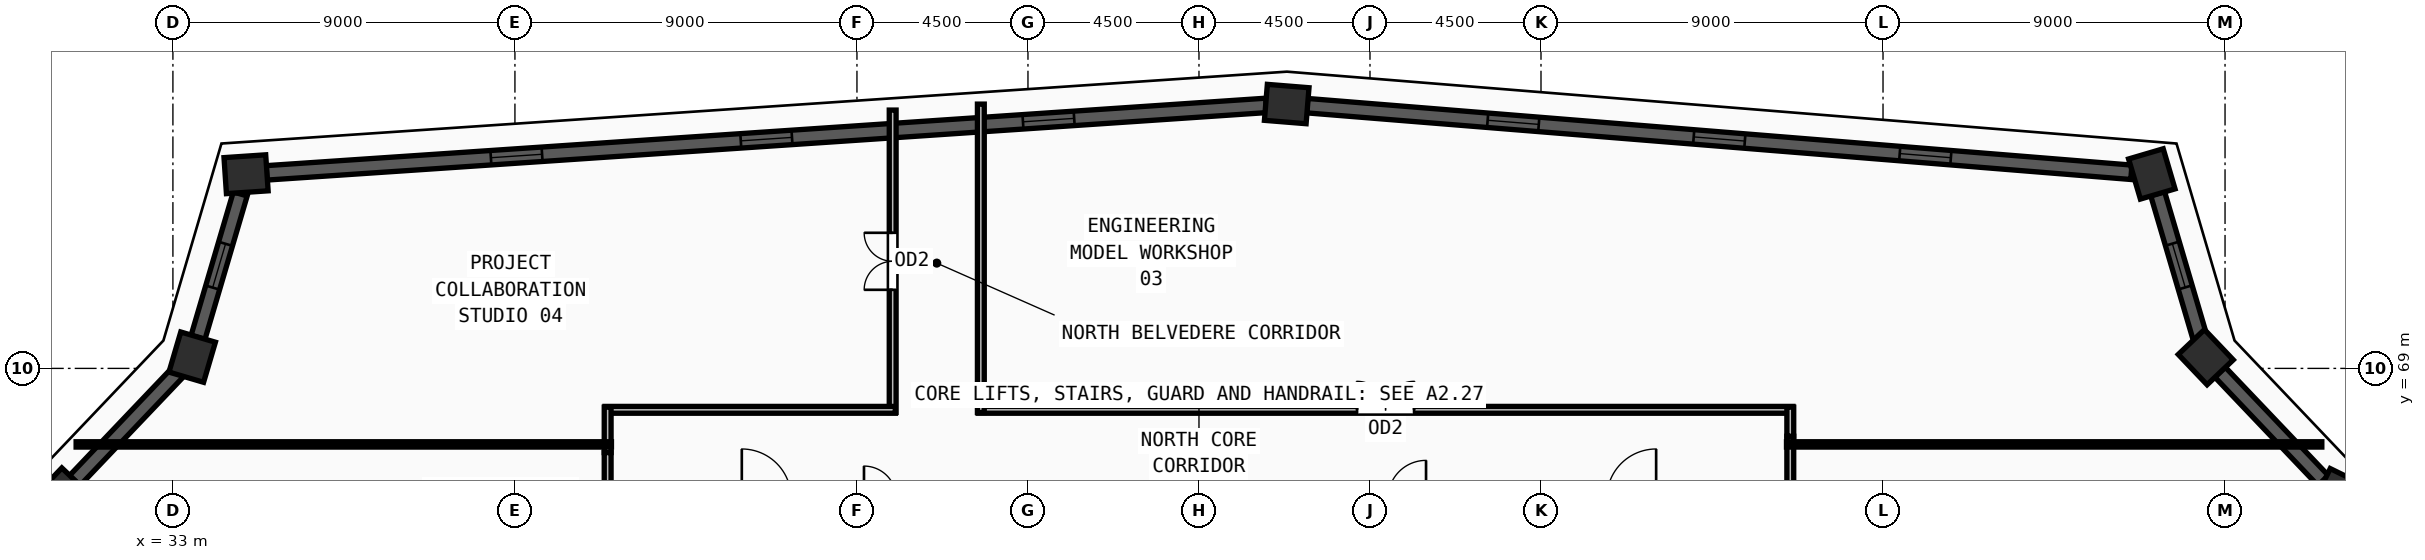
"""IFC4 building model, lengths in metres.
Left out: names, types, materials, properties, quantities, classifications, styles, units other than length and angle.
Written with IfcOpenShell. Run it as: python <this file> out.ifc"""

import sys

from ifc_helpers import new_model, si_unit, direction, frame, frame_2d, origin, origin_2d, place, context, subcontext, project, spatial, rectangle, extrude, source, transform, mapped, element, fill, save


model = new_model("IFC4")
c1 = context("Model", 3, precision=1e-05, world=origin(), true_north=direction((0.0, 1.0)))
c2 = subcontext(c1, "Body", "Model", "MODEL_VIEW")
j1 = project(units=[si_unit("LENGTHUNIT", "METRE"), si_unit("PLANEANGLEUNIT", "RADIAN")], contexts=[c1])
p1 = place(None, origin())
s1 = spatial("IfcSite", under=j1, at=p1, CompositionType="ELEMENT")
p2 = place(p1, origin())
s2 = spatial("IfcBuilding", under=s1, at=p2, CompositionType="ELEMENT")
p3 = place(p2, frame((0.0, 0.0, 309.0)))
s3 = spatial("IfcBuildingStorey", under=s2, at=p3, CompositionType="ELEMENT", Elevation=309.0)
m1 = source(origin(), c2, "Body", "SweptSolid", [
    extrude(rectangle(XDim=1.1, YDim=0.95, at=origin_2d()), origin(), (0.0, 0.0, 1.0), 3.75),
])
for number, where, z_axis, x_axis in (
    (1, (30.042, 65.655, 0.0), (0.0, 0.0, 1.0), (0.689, 0.724, 0.0)),
    (2, (33.507, 69.296, 0.0), (0.0, 0.0, 1.0), (0.283, 0.959, 0.0)),
    (3, (34.925, 74.109, 0.0), (0.0, 0.0, 1.0), (0.998, 0.067, 0.0)),
    (4, (62.309, 75.956, 0.0), (0.0, 0.0, 1.0), (-0.997, 0.081, 0.0)),
    (5, (85.073, 74.117, 0.0), (0.0, 0.0, 1.0), (-0.283, 0.959, 0.0)),
    (6, (86.493, 69.296, 0.0), (0.0, 0.0, 1.0), (-0.689, 0.724, 0.0)),
    (7, (89.952, 65.661, 0.0), (0.0, 0.0, 1.0), (0.441, 0.898, 0.0)),
):
    element("IfcColumn", number, at=place(p3, frame(where, z_axis=z_axis, x_axis=x_axis)), inside=s3, PredefinedType="COLUMN", context=c2, shape_type="MappedRepresentation", body=[
        mapped(m1, transform((0.0, 0.0, 0.0), x_axis=(1.0, 0.0, 0.0), y_axis=(0.0, 1.0, 0.0), z_axis=(0.0, 0.0, 1.0), scale=1.0)),
    ])
p4 = place(p3, frame((89.58, 66.052, 0.0), z_axis=(0.0, 0.0, 1.0), x_axis=(-0.689378051653, 0.724401754484, 0.0)))
e8 = element("IfcWall", 8, at=p4, inside=s3, PredefinedType="SOLIDWALL", context=c2, shape_type="SweptSolid", body=[
    extrude(rectangle(XDim=3.938, YDim=0.38, at=frame_2d((1.969, 0.0))), origin(), (0.0, 0.0, 1.0), 3.57),
])
p5 = place(p3, frame((86.34, 69.814, 0.0), z_axis=(0.0, 0.0, 1.0), x_axis=(-0.28233716639, 0.959315237279, 0.0)))
e9 = element("IfcWall", 9, at=p5, inside=s3, PredefinedType="SOLIDWALL", context=c2, shape_type="SweptSolid", body=[
    extrude(rectangle(XDim=3.946, YDim=0.38, at=frame_2d((1.973, 0.0))), origin(), (0.0, 0.0, 1.0), 3.57),
])
m2 = source(origin(), c2, "Body", "SweptSolid", [
    extrude(rectangle(XDim=1.2, YDim=1.9, at=frame_2d((0.6, 0.95))), frame((0.0, 0.2, 0.0), z_axis=(0.0, -1.0, 0.0), x_axis=(1.0, 0.0, 0.0)), (0.0, 0.0, 1.0), 0.4),
])
p6 = place(p5, frame((1.373, 0.0, 0.55)))
e10 = element("IfcOpeningElement", 10, at=p6, cuts=e9, PredefinedType="OPENING", context=c2, shape_type="MappedRepresentation", body=[
    mapped(m2, transform((0.0, 0.0, 0.0), x_axis=(1.0, 0.0, 0.0), y_axis=(0.0, 1.0, 0.0), z_axis=(0.0, 0.0, 1.0), scale=1.0)),
])
p7 = place(p3, frame((84.535, 74.16, 0.0), z_axis=(0.0, 0.0, 1.0), x_axis=(-0.996748682723, 0.080573342308, 0.0)))
e11 = element("IfcWall", 11, at=p7, inside=s3, PredefinedType="SOLIDWALL", context=c2, shape_type="SweptSolid", body=[
    extrude(rectangle(XDim=21.759, YDim=0.38, at=frame_2d((10.879, 0.0))), origin(), (0.0, 0.0, 1.0), 3.57),
])
m3 = source(origin(), c2, "Body", "SweptSolid", [
    extrude(rectangle(XDim=1.35, YDim=1.85, at=frame_2d((0.675, 0.925))), frame((0.0, 0.2, 0.0), z_axis=(0.0, -1.0, 0.0), x_axis=(1.0, 0.0, 0.0)), (0.0, 0.0, 1.0), 0.4),
])
p8 = place(p7, frame((4.765, 0.0, 0.55)))
e12 = element("IfcOpeningElement", 12, at=p8, cuts=e11, PredefinedType="OPENING", context=c2, shape_type="MappedRepresentation", body=[
    mapped(m3, transform((0.0, 0.0, 0.0), x_axis=(1.0, 0.0, 0.0), y_axis=(0.0, 1.0, 0.0), z_axis=(0.0, 0.0, 1.0), scale=1.0)),
])
p9 = place(p7, frame((10.204, 0.0, 0.55)))
e13 = element("IfcOpeningElement", 13, at=p9, cuts=e11, PredefinedType="OPENING", context=c2, shape_type="MappedRepresentation", body=[
    mapped(m3, transform((0.0, 0.0, 0.0), x_axis=(1.0, 0.0, 0.0), y_axis=(0.0, 1.0, 0.0), z_axis=(0.0, 0.0, 1.0), scale=1.0)),
])
p10 = place(p7, frame((15.644, 0.0, 0.55)))
e14 = element("IfcOpeningElement", 14, at=p10, cuts=e11, PredefinedType="OPENING", context=c2, shape_type="MappedRepresentation", body=[
    mapped(m3, transform((0.0, 0.0, 0.0), x_axis=(1.0, 0.0, 0.0), y_axis=(0.0, 1.0, 0.0), z_axis=(0.0, 0.0, 1.0), scale=1.0)),
])
p11 = place(p3, frame((61.77, 75.92, 0.0), z_axis=(0.0, 0.0, 1.0), x_axis=(-0.997731532318, -0.067318566668, 0.0)))
e15 = element("IfcWall", 15, at=p11, inside=s3, PredefinedType="SOLIDWALL", context=c2, shape_type="SweptSolid", body=[
    extrude(rectangle(XDim=26.366, YDim=0.38, at=frame_2d((13.183, 0.0))), origin(), (0.0, 0.0, 1.0), 3.57),
])
p12 = place(p11, frame((5.066, 0.0, 0.55)))
e16 = element("IfcOpeningElement", 16, at=p12, cuts=e15, PredefinedType="OPENING", context=c2, shape_type="MappedRepresentation", body=[
    mapped(m3, transform((0.0, 0.0, 0.0), x_axis=(1.0, 0.0, 0.0), y_axis=(0.0, 1.0, 0.0), z_axis=(0.0, 0.0, 1.0), scale=1.0)),
])
p13 = place(p11, frame((12.508, 0.0, 0.55)))
e17 = element("IfcOpeningElement", 17, at=p13, cuts=e15, PredefinedType="OPENING", context=c2, shape_type="MappedRepresentation", body=[
    mapped(m3, transform((0.0, 0.0, 0.0), x_axis=(1.0, 0.0, 0.0), y_axis=(0.0, 1.0, 0.0), z_axis=(0.0, 0.0, 1.0), scale=1.0)),
])
p14 = place(p11, frame((19.099, 0.0, 0.55)))
e18 = element("IfcOpeningElement", 18, at=p14, cuts=e15, PredefinedType="OPENING", context=c2, shape_type="MappedRepresentation", body=[
    mapped(m3, transform((0.0, 0.0, 0.0), x_axis=(1.0, 0.0, 0.0), y_axis=(0.0, 1.0, 0.0), z_axis=(0.0, 0.0, 1.0), scale=1.0)),
])
p15 = place(p3, frame((34.772, 73.591, 0.0), z_axis=(0.0, 0.0, 1.0), x_axis=(-0.282434871617, -0.959286476134, 0.0)))
e19 = element("IfcWall", 19, at=p15, inside=s3, PredefinedType="SOLIDWALL", context=c2, shape_type="SweptSolid", body=[
    extrude(rectangle(XDim=3.938, YDim=0.38, at=frame_2d((1.969, 0.0))), origin(), (0.0, 0.0, 1.0), 3.57),
])
p16 = place(p15, frame((1.369, 0.0, 0.55)))
e20 = element("IfcOpeningElement", 20, at=p16, cuts=e19, PredefinedType="OPENING", context=c2, shape_type="MappedRepresentation", body=[
    mapped(m2, transform((0.0, 0.0, 0.0), x_axis=(1.0, 0.0, 0.0), y_axis=(0.0, 1.0, 0.0), z_axis=(0.0, 0.0, 1.0), scale=1.0)),
])
p17 = place(p3, frame((33.135, 68.905, 0.0), z_axis=(0.0, 0.0, 1.0), x_axis=(-0.689384826268, -0.724395307351, 0.0)))
e21 = element("IfcWall", 21, at=p17, inside=s3, PredefinedType="SOLIDWALL", context=c2, shape_type="SweptSolid", body=[
    extrude(rectangle(XDim=3.947, YDim=0.38, at=frame_2d((1.974, 0.0))), origin(), (0.0, 0.0, 1.0), 3.57),
])
p18 = place(p3, frame((75.56, 67.215, 0.0), z_axis=(0.0, 0.0, 1.0), x_axis=(0.0, -1.0, 0.0)))
e22 = element("IfcWall", 22, at=p18, inside=s3, PredefinedType="PARTITIONING", context=c2, shape_type="SweptSolid", body=[
    extrude(rectangle(XDim=9.0, YDim=0.18, at=frame_2d((4.5, 0.0))), origin(), (0.0, 0.0, 1.0), 3.57),
])
m4 = source(origin(), c2, "Body", "SweptSolid", [
    extrude(rectangle(XDim=1.0, YDim=2.2, at=frame_2d((0.5, 1.1))), frame((0.0, 0.1, 0.0), z_axis=(0.0, -1.0, 0.0), x_axis=(1.0, 0.0, 0.0)), (0.0, 0.0, 1.0), 0.2),
])
p19 = place(p18, frame((4.0, 0.0, 0.0)))
e23 = element("IfcOpeningElement", 23, at=p19, cuts=e22, PredefinedType="OPENING", context=c2, shape_type="MappedRepresentation", body=[
    mapped(m4, transform((0.0, 0.0, 0.0), x_axis=(1.0, 0.0, 0.0), y_axis=(0.0, 1.0, 0.0), z_axis=(0.0, 0.0, 1.0), scale=1.0)),
])
p20 = place(p3, frame((54.19, 67.91, 0.0), z_axis=(0.0, 0.0, 1.0), x_axis=(1.0, 0.0, 0.0)))
e24 = element("IfcWall", 24, at=p20, inside=s3, PredefinedType="PARTITIONING", context=c2, shape_type="SweptSolid", body=[
    extrude(rectangle(XDim=21.44, YDim=0.18, at=frame_2d((10.72, 0.0))), origin(), (0.0, 0.0, 1.0), 3.261),
])
m5 = source(origin(), c2, "Body", "SweptSolid", [
    extrude(rectangle(XDim=1.5, YDim=2.2, at=frame_2d((0.75, 1.1))), frame((0.0, 0.1, 0.0), z_axis=(0.0, -1.0, 0.0), x_axis=(1.0, 0.0, 0.0)), (0.0, 0.0, 1.0), 0.2),
])
p21 = place(p20, frame((9.97, 0.0, 0.0)))
e25 = element("IfcOpeningElement", 25, at=p21, cuts=e24, PredefinedType="OPENING", context=c2, shape_type="MappedRepresentation", body=[
    mapped(m5, transform((0.0, 0.0, 0.0), x_axis=(1.0, 0.0, 0.0), y_axis=(0.0, 1.0, 0.0), z_axis=(0.0, 0.0, 1.0), scale=1.0)),
])
p22 = place(p3, frame((51.94, 67.84, 0.0), z_axis=(0.0, 0.0, 1.0), x_axis=(0.0, 1.0, 0.0)))
e26 = element("IfcWall", 26, at=p22, inside=s3, PredefinedType="PARTITIONING", context=c2, shape_type="SweptSolid", body=[
    extrude(rectangle(XDim=7.957, YDim=0.18, at=frame_2d((3.979, 0.0))), origin(), (0.0, 0.0, 1.0), 3.57),
])
p23 = place(p22, frame((3.228, 0.0, 0.0)))
e27 = element("IfcOpeningElement", 27, at=p23, cuts=e26, PredefinedType="OPENING", context=c2, shape_type="MappedRepresentation", body=[
    mapped(m5, transform((0.0, 0.0, 0.0), x_axis=(1.0, 0.0, 0.0), y_axis=(0.0, 1.0, 0.0), z_axis=(0.0, 0.0, 1.0), scale=1.0)),
])
p24 = place(p3, frame((54.26, 75.954, 0.0), z_axis=(0.0, 0.0, 1.0), x_axis=(0.0, -1.0, 0.0)))
e28 = element("IfcWall", 28, at=p24, inside=s3, PredefinedType="PARTITIONING", context=c2, shape_type="SweptSolid", body=[
    extrude(rectangle(XDim=8.114, YDim=0.18, at=frame_2d((4.057, 0.0))), origin(), (0.0, 0.0, 1.0), 3.57),
])
p25 = place(p3, frame((75.56, 67.98, 0.0), z_axis=(0.0, 0.0, 1.0), x_axis=(0.0, -1.0, 0.0)))
e29 = element("IfcWall", 29, at=p25, inside=s3, PredefinedType="PARTITIONING", context=c2, shape_type="SweptSolid", body=[
    extrude(rectangle(XDim=0.765, YDim=0.18, at=frame_2d((0.382, 0.0))), origin(), (0.0, 0.0, 1.0), 3.57),
])
p26 = place(p3, frame((44.37, 67.91, 0.0), z_axis=(0.0, 0.0, 1.0), x_axis=(1.0, 0.0, 0.0)))
e30 = element("IfcWall", 30, at=p26, inside=s3, PredefinedType="PARTITIONING", context=c2, shape_type="SweptSolid", body=[
    extrude(rectangle(XDim=7.64, YDim=0.18, at=frame_2d((3.82, 0.0))), origin(), (0.0, 0.0, 1.0), 3.57),
])
p27 = place(p3, frame((44.44, 66.785, 0.0), z_axis=(0.0, 0.0, 1.0), x_axis=(0.0, 1.0, 0.0)))
e31 = element("IfcWall", 31, at=p27, inside=s3, PredefinedType="PARTITIONING", context=c2, shape_type="SweptSolid", body=[
    extrude(rectangle(XDim=1.195, YDim=0.18, at=frame_2d((0.598, 0.0))), origin(), (0.0, 0.0, 1.0), 3.57),
])
p28 = place(p3, frame((44.44, 64.98, 0.0), z_axis=(0.0, 0.0, 1.0), x_axis=(0.0, 1.0, 0.0)))
e32 = element("IfcWall", 32, at=p28, inside=s3, PredefinedType="PARTITIONING", context=c2, shape_type="SweptSolid", body=[
    extrude(rectangle(XDim=1.805, YDim=0.18, at=frame_2d((0.902, 0.0))), origin(), (0.0, 0.0, 1.0), 3.57),
])
for number, where, z_axis, x_axis in (
    (33, (44.54, 67.0, 0.0), (0.0, 0.0, 1.0), (-1.0, 0.0, 0.0)),
    (34, (75.46, 67.0, 0.0), (0.0, 0.0, 1.0), (1.0, 0.0, 0.0)),
):
    element("IfcWall", number, at=place(p3, frame(where, z_axis=z_axis, x_axis=x_axis)), inside=s3, PredefinedType="PARTITIONING", context=c2, shape_type="SweptSolid", body=[
        extrude(rectangle(XDim=14.087, YDim=0.14, at=frame_2d((7.043, 0.0))), origin(), (0.0, 0.0, 1.0), 3.261),
    ])
m6 = source(origin(), c2, "Body", "SweptSolid", [
    extrude(rectangle(XDim=1.2, YDim=1.9, at=frame_2d((0.6, 0.95))), frame((0.0, 0.03, 0.0), z_axis=(0.0, -1.0, 0.0), x_axis=(1.0, 0.0, 0.0)), (0.0, 0.0, 1.0), 0.06),
])
p29 = place(p6, origin())
e35 = element("IfcWindow", 35, at=p29, inside=s3, PartitioningType="SINGLE_PANEL", PredefinedType="WINDOW", context=c2, shape_type="MappedRepresentation", body=[
    mapped(m6, transform((0.0, 0.0, 0.0), x_axis=(1.0, 0.0, 0.0), y_axis=(0.0, 1.0, 0.0), z_axis=(0.0, 0.0, 1.0), scale=1.0)),
])
fill(e10, e35)
m7 = source(origin(), c2, "Body", "SweptSolid", [
    extrude(rectangle(XDim=1.35, YDim=1.85, at=frame_2d((0.675, 0.925))), frame((0.0, 0.03, 0.0), z_axis=(0.0, -1.0, 0.0), x_axis=(1.0, 0.0, 0.0)), (0.0, 0.0, 1.0), 0.06),
])
p30 = place(p8, origin())
e36 = element("IfcWindow", 36, at=p30, inside=s3, PartitioningType="SINGLE_PANEL", PredefinedType="WINDOW", context=c2, shape_type="MappedRepresentation", body=[
    mapped(m7, transform((0.0, 0.0, 0.0), x_axis=(1.0, 0.0, 0.0), y_axis=(0.0, 1.0, 0.0), z_axis=(0.0, 0.0, 1.0), scale=1.0)),
])
fill(e12, e36)
p31 = place(p9, origin())
e37 = element("IfcWindow", 37, at=p31, inside=s3, PartitioningType="SINGLE_PANEL", PredefinedType="WINDOW", context=c2, shape_type="MappedRepresentation", body=[
    mapped(m7, transform((0.0, 0.0, 0.0), x_axis=(1.0, 0.0, 0.0), y_axis=(0.0, 1.0, 0.0), z_axis=(0.0, 0.0, 1.0), scale=1.0)),
])
fill(e13, e37)
p32 = place(p10, origin())
e38 = element("IfcWindow", 38, at=p32, inside=s3, PartitioningType="SINGLE_PANEL", PredefinedType="WINDOW", context=c2, shape_type="MappedRepresentation", body=[
    mapped(m7, transform((0.0, 0.0, 0.0), x_axis=(1.0, 0.0, 0.0), y_axis=(0.0, 1.0, 0.0), z_axis=(0.0, 0.0, 1.0), scale=1.0)),
])
fill(e14, e38)
p33 = place(p12, origin())
e39 = element("IfcWindow", 39, at=p33, inside=s3, PartitioningType="SINGLE_PANEL", PredefinedType="WINDOW", context=c2, shape_type="MappedRepresentation", body=[
    mapped(m7, transform((0.0, 0.0, 0.0), x_axis=(1.0, 0.0, 0.0), y_axis=(0.0, 1.0, 0.0), z_axis=(0.0, 0.0, 1.0), scale=1.0)),
])
fill(e16, e39)
p34 = place(p13, origin())
e40 = element("IfcWindow", 40, at=p34, inside=s3, PartitioningType="SINGLE_PANEL", PredefinedType="WINDOW", context=c2, shape_type="MappedRepresentation", body=[
    mapped(m7, transform((0.0, 0.0, 0.0), x_axis=(1.0, 0.0, 0.0), y_axis=(0.0, 1.0, 0.0), z_axis=(0.0, 0.0, 1.0), scale=1.0)),
])
fill(e17, e40)
p35 = place(p14, origin())
e41 = element("IfcWindow", 41, at=p35, inside=s3, PartitioningType="SINGLE_PANEL", PredefinedType="WINDOW", context=c2, shape_type="MappedRepresentation", body=[
    mapped(m7, transform((0.0, 0.0, 0.0), x_axis=(1.0, 0.0, 0.0), y_axis=(0.0, 1.0, 0.0), z_axis=(0.0, 0.0, 1.0), scale=1.0)),
])
fill(e18, e41)
p36 = place(p16, origin())
e42 = element("IfcWindow", 42, at=p36, inside=s3, PartitioningType="SINGLE_PANEL", PredefinedType="WINDOW", context=c2, shape_type="MappedRepresentation", body=[
    mapped(m6, transform((0.0, 0.0, 0.0), x_axis=(1.0, 0.0, 0.0), y_axis=(0.0, 1.0, 0.0), z_axis=(0.0, 0.0, 1.0), scale=1.0)),
])
fill(e20, e42)
m8 = source(origin(), c2, "Body", "SweptSolid", [
    extrude(rectangle(XDim=1.5, YDim=2.2, at=frame_2d((0.75, 1.1))), frame((0.0, 0.025, 0.0), z_axis=(0.0, -1.0, 0.0), x_axis=(1.0, 0.0, 0.0)), (0.0, 0.0, 1.0), 0.05),
])
p37 = place(p21, origin())
e43 = element("IfcDoor", 43, at=p37, inside=s3, OperationType="DOUBLE_DOOR_SINGLE_SWING", PredefinedType="DOOR", context=c2, shape_type="MappedRepresentation", body=[
    mapped(m8, transform((0.0, 0.0, 0.0), x_axis=(1.0, 0.0, 0.0), y_axis=(0.0, 1.0, 0.0), z_axis=(0.0, 0.0, 1.0), scale=1.0)),
])
fill(e25, e43)
p38 = place(p23, origin())
e44 = element("IfcDoor", 44, at=p38, inside=s3, OperationType="DOUBLE_DOOR_SINGLE_SWING", PredefinedType="DOOR", context=c2, shape_type="MappedRepresentation", body=[
    mapped(m8, transform((0.0, 0.0, 0.0), x_axis=(1.0, 0.0, 0.0), y_axis=(0.0, 1.0, 0.0), z_axis=(0.0, 0.0, 1.0), scale=1.0)),
])
fill(e27, e44)
save(model, sys.argv[1])
